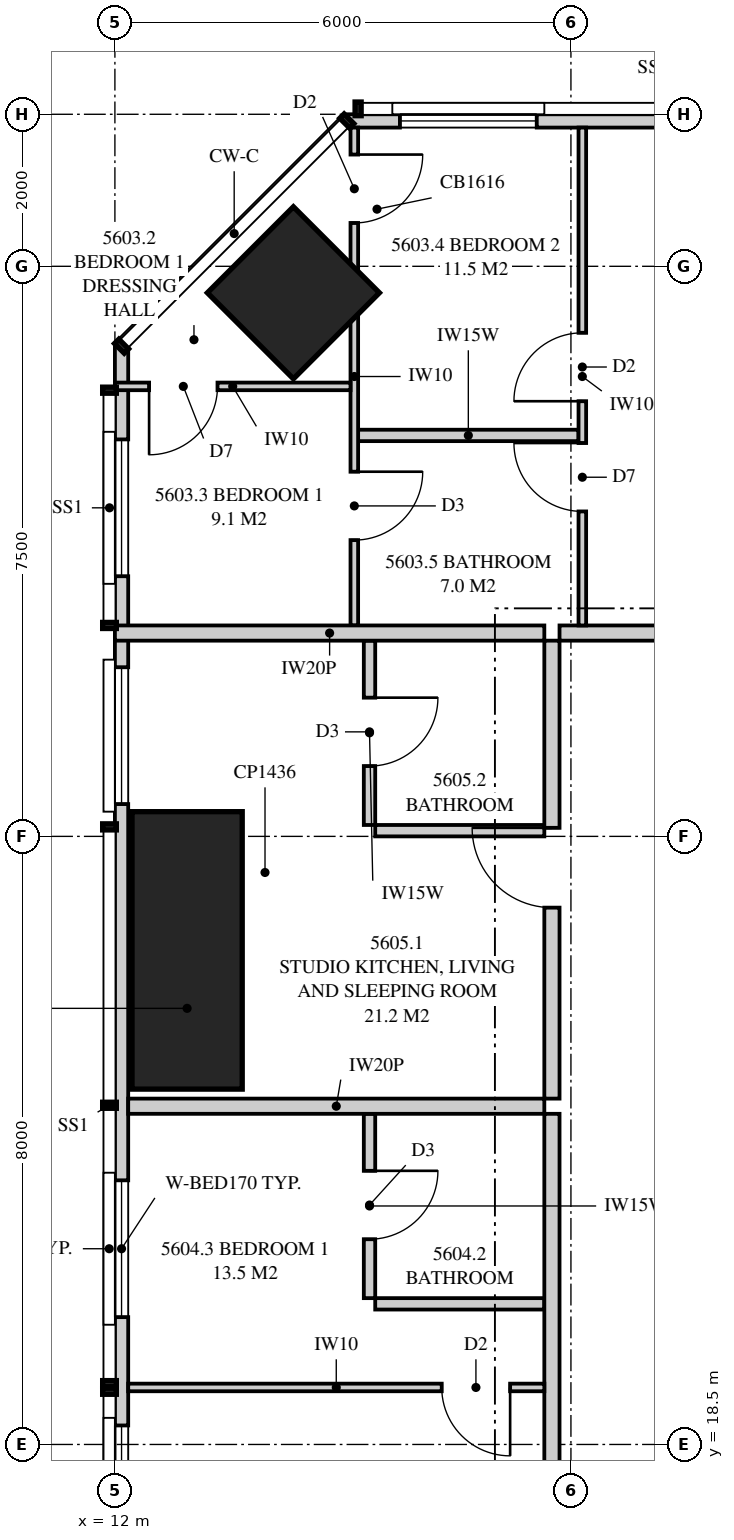
"""IFC4 building model, lengths in metres.
Left out: names, types, materials, properties, quantities, classifications, styles, units other than length and angle.
Written with IfcOpenShell. Run it as: python <this file> out.ifc"""

import sys

from ifc_helpers import new_model, si_unit, direction, frame, frame_2d, origin, origin_2d, place, context, subcontext, project, spatial, polyline, rectangle, hollow_rectangle, outline, extrude, element, fill, save


model = new_model("IFC4")
c1 = context("Model", 3, precision=1e-05, world=origin(), true_north=direction((0.0, 1.0)))
c2 = subcontext(c1, "Body", "Model", "MODEL_VIEW")
j1 = project(units=[si_unit("LENGTHUNIT", "METRE"), si_unit("PLANEANGLEUNIT", "RADIAN")], contexts=[c1])
p1 = place(None, origin())
s1 = spatial("IfcSite", under=j1, at=p1, CompositionType="ELEMENT")
p2 = place(p1, origin())
s2 = spatial("IfcBuilding", under=s1, at=p2, CompositionType="ELEMENT")
p3 = place(p2, frame((0.0, 0.0, 204.6)))
s3 = spatial("IfcBuildingStorey", under=s2, at=p3, CompositionType="ELEMENT", Elevation=204.6)
p4 = place(p3, frame((14.348, 33.652, 0.0), z_axis=(0.0, 0.0, 1.0), x_axis=(0.707106781187, -0.707106781187, 0.0)))
e1 = element("IfcColumn", 1, at=p4, inside=s3, PredefinedType="COLUMN", context=c2, shape_type="SweptSolid", body=[
    extrude(hollow_rectangle(XDim=1.6, YDim=1.6, WallThickness=0.125, at=origin_2d()), origin(), (0.0, 0.0, 1.0), 3.35),
])
p5 = place(p3, frame((12.95, 25.0, 0.0), z_axis=(0.0, 0.0, 1.0), x_axis=(1.0, 0.0, 0.0)))
e2 = element("IfcColumn", 2, at=p5, inside=s3, PredefinedType="COLUMN", context=c2, shape_type="SweptSolid", body=[
    extrude(rectangle(XDim=1.45, YDim=3.65, at=origin_2d()), origin(), (0.0, 0.0, 1.0), 3.35),
])
p6 = place(p3, frame((49.949, 35.913, 0.0), z_axis=(0.0, 0.0, 1.0), x_axis=(-1.0, 0.0, 0.0)))
e3 = element("IfcWall", 3, at=p6, inside=s3, PredefinedType="SOLIDWALL", context=c2, shape_type="SweptSolid", body=[
    extrude(rectangle(XDim=34.897, YDim=0.175, at=frame_2d((17.449, 0.0))), origin(), (0.0, 0.0, 1.0), 3.07),
])
p7 = place(p6, frame((13.174, 0.0, 0.0)))
e4 = element("IfcOpeningElement", 4, at=p7, cuts=e3, PredefinedType="OPENING", context=c2, shape_type="SweptSolid", body=[
    extrude(rectangle(XDim=1.8, YDim=2.1, at=frame_2d((0.9, 1.05))), frame((0.0, 0.097, 0.0), z_axis=(0.0, -1.0, 0.0), x_axis=(1.0, 0.0, 0.0)), (0.0, 0.0, 1.0), 0.195),
])
p8 = place(p6, frame((19.374, 0.0, 0.4)))
e5 = element("IfcOpeningElement", 5, at=p8, cuts=e3, PredefinedType="OPENING", context=c2, shape_type="SweptSolid", body=[
    extrude(rectangle(XDim=1.8, YDim=1.7, at=frame_2d((0.9, 0.85))), frame((0.0, 0.097, 0.0), z_axis=(0.0, -1.0, 0.0), x_axis=(1.0, 0.0, 0.0)), (0.0, 0.0, 1.0), 0.195),
])
p9 = place(p6, frame((23.224, 0.0, 0.4)))
e6 = element("IfcOpeningElement", 6, at=p9, cuts=e3, PredefinedType="OPENING", context=c2, shape_type="SweptSolid", body=[
    extrude(rectangle(XDim=2.4, YDim=1.7, at=frame_2d((1.2, 0.85))), frame((0.0, 0.097, 0.0), z_axis=(0.0, -1.0, 0.0), x_axis=(1.0, 0.0, 0.0)), (0.0, 0.0, 1.0), 0.195),
])
p10 = place(p6, frame((32.399, 0.0, 0.4)))
e7 = element("IfcOpeningElement", 7, at=p10, cuts=e3, PredefinedType="OPENING", context=c2, shape_type="SweptSolid", body=[
    extrude(rectangle(XDim=1.8, YDim=1.7, at=frame_2d((0.9, 0.85))), frame((0.0, 0.097, 0.0), z_axis=(0.0, -1.0, 0.0), x_axis=(1.0, 0.0, 0.0)), (0.0, 0.0, 1.0), 0.195),
])
p11 = place(p3, frame((12.087, 32.949, 0.0), z_axis=(0.0, 0.0, 1.0), x_axis=(0.0, -1.0, 0.0)))
e8 = element("IfcWall", 8, at=p11, inside=s3, PredefinedType="SOLIDWALL", context=c2, shape_type="SweptSolid", body=[
    extrude(rectangle(XDim=29.897, YDim=0.175, at=frame_2d((14.949, 0.0))), origin(), (0.0, 0.0, 1.0), 3.07),
])
p12 = place(p11, frame((1.226, 0.0, 0.4)))
e9 = element("IfcOpeningElement", 9, at=p12, cuts=e8, PredefinedType="OPENING", context=c2, shape_type="SweptSolid", body=[
    extrude(rectangle(XDim=1.8, YDim=1.7, at=frame_2d((0.9, 0.85))), frame((0.0, 0.097, 0.0), z_axis=(0.0, -1.0, 0.0), x_axis=(1.0, 0.0, 0.0)), (0.0, 0.0, 1.0), 0.195),
])
p13 = place(p11, frame((4.224, 0.0, 0.4)))
e10 = element("IfcOpeningElement", 10, at=p13, cuts=e8, PredefinedType="OPENING", context=c2, shape_type="SweptSolid", body=[
    extrude(rectangle(XDim=1.8, YDim=1.7, at=frame_2d((0.9, 0.85))), frame((0.0, 0.097, 0.0), z_axis=(0.0, -1.0, 0.0), x_axis=(1.0, 0.0, 0.0)), (0.0, 0.0, 1.0), 0.195),
])
p14 = place(p11, frame((10.974, 0.0, 0.4)))
e11 = element("IfcOpeningElement", 11, at=p14, cuts=e8, PredefinedType="OPENING", context=c2, shape_type="SweptSolid", body=[
    extrude(rectangle(XDim=1.8, YDim=1.7, at=frame_2d((0.9, 0.85))), frame((0.0, 0.097, 0.0), z_axis=(0.0, -1.0, 0.0), x_axis=(1.0, 0.0, 0.0)), (0.0, 0.0, 1.0), 0.195),
])
p15 = place(p11, frame((14.199, 0.0, 0.4)))
e12 = element("IfcOpeningElement", 12, at=p15, cuts=e8, PredefinedType="OPENING", context=c2, shape_type="SweptSolid", body=[
    extrude(rectangle(XDim=1.8, YDim=1.7, at=frame_2d((0.9, 0.85))), frame((0.0, 0.097, 0.0), z_axis=(0.0, -1.0, 0.0), x_axis=(1.0, 0.0, 0.0)), (0.0, 0.0, 1.0), 0.195),
])
p16 = place(p11, frame((22.624, 0.0, 0.0)))
e13 = element("IfcOpeningElement", 13, at=p16, cuts=e8, PredefinedType="OPENING", context=c2, shape_type="SweptSolid", body=[
    extrude(rectangle(XDim=1.8, YDim=2.1, at=frame_2d((0.9, 1.05))), frame((0.0, 0.097, 0.0), z_axis=(0.0, -1.0, 0.0), x_axis=(1.0, 0.0, 0.0)), (0.0, 0.0, 1.0), 0.195),
])
p17 = place(p11, frame((16.799, 0.0, 0.4)))
e14 = element("IfcOpeningElement", 14, at=p17, cuts=e8, PredefinedType="OPENING", context=c2, shape_type="SweptSolid", body=[
    extrude(rectangle(XDim=1.2, YDim=1.7, at=frame_2d((0.6, 0.85))), frame((0.0, 0.097, 0.0), z_axis=(0.0, -1.0, 0.0), x_axis=(1.0, 0.0, 0.0)), (0.0, 0.0, 1.0), 0.195),
])
p18 = place(p11, frame((26.371, 0.0, 0.4)))
e15 = element("IfcOpeningElement", 15, at=p18, cuts=e8, PredefinedType="OPENING", context=c2, shape_type="SweptSolid", body=[
    extrude(rectangle(XDim=1.8, YDim=1.7, at=frame_2d((0.9, 0.85))), frame((0.0, 0.097, 0.0), z_axis=(0.0, -1.0, 0.0), x_axis=(1.0, 0.0, 0.0)), (0.0, 0.0, 1.0), 0.195),
])
p19 = place(p3, frame((17.85, 29.175, 0.0), z_axis=(0.0, 0.0, 1.0), x_axis=(1.0, 0.0, 0.0)))
e16 = element("IfcWall", 16, at=p19, inside=s3, PredefinedType="PARTITIONING", context=c2, shape_type="SweptSolid", body=[
    extrude(outline(polyline([(0.0, 0.0), (3.85, 0.0), (3.85, 2.47), (3.69, 2.47), (3.69, 3.07), (3.079, 3.07), (3.079, 2.491), (2.535, 2.491), (2.535, 3.07), (0.0, 3.07), (0.0, 0.0)])), frame((0.0, 0.1, 0.0), z_axis=(0.0, -1.0, 0.0), x_axis=(1.0, 0.0, 0.0)), (0.0, 0.0, 1.0), 0.2),
])
p20 = place(p3, frame((15.15, 35.825, 0.0), z_axis=(0.0, 0.0, 1.0), x_axis=(0.0, -1.0, 0.0)))
e17 = element("IfcWall", 17, at=p20, inside=s3, PredefinedType="PARTITIONING", context=c2, shape_type="SweptSolid", body=[
    extrude(outline(polyline([(0.0, 0.0), (6.55, 0.0), (6.55, 3.07), (2.565, 3.07), (2.548, 3.043), (2.548, 2.07), (1.515, 2.07), (1.515, 3.07), (0.0, 3.07), (0.0, 0.0)])), frame((0.0, 0.05, 0.0), z_axis=(0.0, -1.0, 0.0), x_axis=(1.0, 0.0, 0.0)), (0.0, 0.0, 1.0), 0.1),
])
p21 = place(p20, frame((0.355, 0.0, 0.0)))
e18 = element("IfcOpeningElement", 18, at=p21, cuts=e17, PredefinedType="OPENING", context=c2, shape_type="SweptSolid", body=[
    extrude(rectangle(XDim=0.9, YDim=2.1, at=frame_2d((0.45, 1.05))), frame((0.0, 0.06, 0.0), z_axis=(0.0, -1.0, 0.0), x_axis=(1.0, 0.0, 0.0)), (0.0, 0.0, 1.0), 0.12),
])
p22 = place(p20, frame((4.527, 0.0, 0.0)))
e19 = element("IfcOpeningElement", 19, at=p22, cuts=e17, PredefinedType="OPENING", context=c2, shape_type="SweptSolid", body=[
    extrude(rectangle(XDim=0.9, YDim=2.1, at=frame_2d((0.45, 1.05))), frame((0.0, 0.06, 0.0), z_axis=(0.0, -1.0, 0.0), x_axis=(1.0, 0.0, 0.0)), (0.0, 0.0, 1.0), 0.12),
])
p23 = place(p3, frame((18.15, 35.825, 0.0), z_axis=(0.0, 0.0, 1.0), x_axis=(0.0, -1.0, 0.0)))
e20 = element("IfcWall", 20, at=p23, inside=s3, PredefinedType="PARTITIONING", context=c2, shape_type="SweptSolid", body=[
    extrude(outline(polyline([(0.0, 0.0), (6.55, 0.0), (6.55, 3.07), (2.017, 3.07), (2.017, 2.07), (0.984, 2.07), (0.984, 3.07), (0.0, 3.07), (0.0, 0.0)])), frame((0.0, 0.05, 0.0), z_axis=(0.0, -1.0, 0.0), x_axis=(1.0, 0.0, 0.0)), (0.0, 0.0, 1.0), 0.1),
])
p24 = place(p23, frame((2.7, 0.0, 0.0)))
e21 = element("IfcOpeningElement", 21, at=p24, cuts=e20, PredefinedType="OPENING", context=c2, shape_type="SweptSolid", body=[
    extrude(rectangle(XDim=0.9, YDim=2.1, at=frame_2d((0.45, 1.05))), frame((0.0, 0.06, 0.0), z_axis=(0.0, -1.0, 0.0), x_axis=(1.0, 0.0, 0.0)), (0.0, 0.0, 1.0), 0.12),
])
p25 = place(p23, frame((4.15, 0.0, 0.0)))
e22 = element("IfcOpeningElement", 22, at=p25, cuts=e20, PredefinedType="OPENING", context=c2, shape_type="SweptSolid", body=[
    extrude(rectangle(XDim=0.9, YDim=2.1, at=frame_2d((0.45, 1.05))), frame((0.0, 0.06, 0.0), z_axis=(0.0, -1.0, 0.0), x_axis=(1.0, 0.0, 0.0)), (0.0, 0.0, 1.0), 0.12),
])
p26 = place(p3, frame((12.0, 32.42, 0.0), z_axis=(0.0, 0.0, 1.0), x_axis=(1.0, 0.0, 0.0)))
e23 = element("IfcWall", 23, at=p26, inside=s3, PredefinedType="PARTITIONING", context=c2, shape_type="SweptSolid", body=[
    extrude(outline(polyline([(0.0, 0.0), (3.1, 0.0), (3.1, 3.07), (2.664, 3.07), (2.664, 2.07), (1.635, 2.07), (1.635, 3.07), (0.0, 3.07), (0.0, 0.0)])), frame((0.0, 0.05, 0.0), z_axis=(0.0, -1.0, 0.0), x_axis=(1.0, 0.0, 0.0)), (0.0, 0.0, 1.0), 0.1),
])
p27 = place(p26, frame((0.45, 0.0, 0.0)))
e24 = element("IfcOpeningElement", 24, at=p27, cuts=e23, PredefinedType="OPENING", context=c2, shape_type="SweptSolid", body=[
    extrude(rectangle(XDim=0.9, YDim=2.1, at=frame_2d((0.45, 1.05))), frame((0.0, 0.06, 0.0), z_axis=(0.0, -1.0, 0.0), x_axis=(1.0, 0.0, 0.0)), (0.0, 0.0, 1.0), 0.12),
])
p28 = place(p3, frame((15.2, 31.775, 0.0), z_axis=(0.0, 0.0, 1.0), x_axis=(1.0, 0.0, 0.0)))
e25 = element("IfcWall", 25, at=p28, inside=s3, PredefinedType="PLUMBINGWALL", context=c2, shape_type="SweptSolid", body=[
    extrude(rectangle(XDim=2.9, YDim=0.15, at=frame_2d((1.45, 0.0))), origin(), (0.0, 0.0, 1.0), 3.07),
])
p29 = place(p3, frame((12.0, 29.175, 0.0), z_axis=(0.0, 0.0, 1.0), x_axis=(1.0, 0.0, 0.0)))
e26 = element("IfcWall", 26, at=p29, inside=s3, PredefinedType="PARTITIONING", context=c2, shape_type="SweptSolid", body=[
    extrude(outline(polyline([(0.0, 0.0), (5.65, 0.0), (5.65, 3.07), (2.147, 3.07), (2.147, 2.07), (1.102, 2.07), (1.102, 3.07), (0.0, 3.07), (0.0, 0.0)])), frame((0.0, 0.1, 0.0), z_axis=(0.0, -1.0, 0.0), x_axis=(1.0, 0.0, 0.0)), (0.0, 0.0, 1.0), 0.2),
])
p30 = place(p3, frame((12.175, 22.95, 0.0), z_axis=(0.0, 0.0, 1.0), x_axis=(1.0, 0.0, 0.0)))
e27 = element("IfcWall", 27, at=p30, inside=s3, PredefinedType="PARTITIONING", context=c2, shape_type="SweptSolid", body=[
    extrude(outline(polyline([(0.0, 0.0), (5.475, 0.0), (5.475, 3.07), (1.674, 3.07), (1.674, 3.014), (1.63, 2.924), (1.275, 2.895), (1.275, 2.07), (0.275, 2.07), (0.275, 3.07), (0.0, 3.07), (0.0, 0.0)])), frame((0.0, 0.1, 0.0), z_axis=(0.0, -1.0, 0.0), x_axis=(1.0, 0.0, 0.0)), (0.0, 0.0, 1.0), 0.2),
])
p31 = place(p3, frame((17.75, 7.925, 0.0), z_axis=(0.0, 0.0, 1.0), x_axis=(0.0, 1.0, 0.0)))
e28 = element("IfcWall", 28, at=p31, inside=s3, PredefinedType="PARTITIONING", context=c2, shape_type="SweptSolid", body=[
    extrude(outline(polyline([(0.0, 0.0), (14.925, 0.0), (14.925, 3.07), (5.287, 3.07), (5.287, 2.595), (4.863, 2.595), (4.863, 3.07), (0.0, 3.07), (0.0, 0.0)])), frame((0.0, 0.1, 0.0), z_axis=(0.0, -1.0, 0.0), x_axis=(1.0, 0.0, 0.0)), (0.0, 0.0, 1.0), 0.2),
])
p32 = place(p31, frame((6.962, 0.0, 0.0)))
e29 = element("IfcOpeningElement", 29, at=p32, cuts=e28, PredefinedType="OPENING", context=c2, shape_type="SweptSolid", body=[
    extrude(rectangle(XDim=1.05, YDim=2.2, at=frame_2d((0.525, 1.1))), frame((0.0, 0.11, 0.0), z_axis=(0.0, -1.0, 0.0), x_axis=(1.0, 0.0, 0.0)), (0.0, 0.0, 1.0), 0.22),
])
p33 = place(p3, frame((15.35, 20.425, 0.0), z_axis=(0.0, 0.0, 1.0), x_axis=(0.0, 1.0, 0.0)))
e30 = element("IfcWall", 30, at=p33, inside=s3, PredefinedType="PLUMBINGWALL", context=c2, shape_type="SweptSolid", body=[
    extrude(rectangle(XDim=2.425, YDim=0.15, at=frame_2d((1.212, 0.0))), origin(), (0.0, 0.0, 1.0), 3.07),
])
p34 = place(p33, frame((0.775, 0.0, 0.0)))
e31 = element("IfcOpeningElement", 31, at=p34, cuts=e30, PredefinedType="OPENING", context=c2, shape_type="SweptSolid", body=[
    extrude(rectangle(XDim=0.9, YDim=2.1, at=frame_2d((0.45, 1.05))), frame((0.0, 0.085, 0.0), z_axis=(0.0, -1.0, 0.0), x_axis=(1.0, 0.0, 0.0)), (0.0, 0.0, 1.0), 0.17),
])
p35 = place(p3, frame((15.425, 20.35, 0.0), z_axis=(0.0, 0.0, 1.0), x_axis=(1.0, 0.0, 0.0)))
e32 = element("IfcWall", 32, at=p35, inside=s3, PredefinedType="PLUMBINGWALL", context=c2, shape_type="SweptSolid", body=[
    extrude(rectangle(XDim=2.225, YDim=0.15, at=frame_2d((1.112, 0.0))), origin(), (0.0, 0.0, 1.0), 3.07),
])
p36 = place(p3, frame((12.175, 19.25, 0.0), z_axis=(0.0, 0.0, 1.0), x_axis=(1.0, 0.0, 0.0)))
e33 = element("IfcWall", 33, at=p36, inside=s3, PredefinedType="PARTITIONING", context=c2, shape_type="SweptSolid", body=[
    extrude(outline(polyline([(0.0, 0.0), (5.475, 0.0), (5.475, 3.07), (1.275, 3.07), (1.275, 2.07), (0.275, 2.07), (0.275, 3.07), (0.0, 3.07), (0.0, 0.0)])), frame((0.0, 0.05, 0.0), z_axis=(0.0, -1.0, 0.0), x_axis=(1.0, 0.0, 0.0)), (0.0, 0.0, 1.0), 0.1),
])
p37 = place(p36, frame((4.125, 0.0, 0.0)))
e34 = element("IfcOpeningElement", 34, at=p37, cuts=e33, PredefinedType="OPENING", context=c2, shape_type="SweptSolid", body=[
    extrude(rectangle(XDim=0.9, YDim=2.1, at=frame_2d((0.45, 1.05))), frame((0.0, 0.06, 0.0), z_axis=(0.0, -1.0, 0.0), x_axis=(1.0, 0.0, 0.0)), (0.0, 0.0, 1.0), 0.12),
])
p38 = place(p3, frame((17.75, 23.05, 0.0), z_axis=(0.0, 0.0, 1.0), x_axis=(0.0, 1.0, 0.0)))
e35 = element("IfcWall", 35, at=p38, inside=s3, PredefinedType="PARTITIONING", context=c2, shape_type="SweptSolid", body=[
    extrude(outline(polyline([(0.0, 0.0), (6.025, 0.0), (6.025, 3.07), (2.162, 3.07), (2.162, 2.595), (1.738, 2.595), (1.738, 3.07), (0.0, 3.07), (0.0, 0.0)])), frame((0.0, 0.1, 0.0), z_axis=(0.0, -1.0, 0.0), x_axis=(1.0, 0.0, 0.0)), (0.0, 0.0, 1.0), 0.2),
])
p39 = place(p38, frame((2.512, 0.0, 0.0)))
e36 = element("IfcOpeningElement", 36, at=p39, cuts=e35, PredefinedType="OPENING", context=c2, shape_type="SweptSolid", body=[
    extrude(rectangle(XDim=1.05, YDim=2.2, at=frame_2d((0.525, 1.1))), frame((0.0, 0.11, 0.0), z_axis=(0.0, -1.0, 0.0), x_axis=(1.0, 0.0, 0.0)), (0.0, 0.0, 1.0), 0.22),
])
p40 = place(p3, frame((15.35, 26.65, 0.0), z_axis=(0.0, 0.0, 1.0), x_axis=(0.0, 1.0, 0.0)))
e37 = element("IfcWall", 37, at=p40, inside=s3, PredefinedType="PLUMBINGWALL", context=c2, shape_type="SweptSolid", body=[
    extrude(rectangle(XDim=2.425, YDim=0.15, at=frame_2d((1.212, 0.0))), origin(), (0.0, 0.0, 1.0), 3.07),
])
p41 = place(p40, frame((0.775, 0.0, 0.0)))
e38 = element("IfcOpeningElement", 38, at=p41, cuts=e37, PredefinedType="OPENING", context=c2, shape_type="SweptSolid", body=[
    extrude(rectangle(XDim=0.9, YDim=2.1, at=frame_2d((0.45, 1.05))), frame((0.0, 0.085, 0.0), z_axis=(0.0, -1.0, 0.0), x_axis=(1.0, 0.0, 0.0)), (0.0, 0.0, 1.0), 0.17),
])
p42 = place(p3, frame((15.425, 26.575, 0.0), z_axis=(0.0, 0.0, 1.0), x_axis=(1.0, 0.0, 0.0)))
e39 = element("IfcWall", 39, at=p42, inside=s3, PredefinedType="PLUMBINGWALL", context=c2, shape_type="SweptSolid", body=[
    extrude(rectangle(XDim=2.225, YDim=0.15, at=frame_2d((1.112, 0.0))), origin(), (0.0, 0.0, 1.0), 3.07),
])
p43 = place(p10, origin())
e40 = element("IfcWindow", 40, at=p43, inside=s3, PartitioningType="SINGLE_PANEL", PredefinedType="WINDOW", context=c2, shape_type="SweptSolid", body=[
    extrude(rectangle(XDim=1.8, YDim=1.7, at=frame_2d((0.9, 0.85))), frame((0.0, 0.03, 0.0), z_axis=(0.0, -1.0, 0.0), x_axis=(1.0, 0.0, 0.0)), (0.0, 0.0, 1.0), 0.06),
])
fill(e7, e40)
p44 = place(p12, origin())
e41 = element("IfcWindow", 41, at=p44, inside=s3, PartitioningType="SINGLE_PANEL", PredefinedType="WINDOW", context=c2, shape_type="SweptSolid", body=[
    extrude(rectangle(XDim=1.8, YDim=1.7, at=frame_2d((0.9, 0.85))), frame((0.0, 0.03, 0.0), z_axis=(0.0, -1.0, 0.0), x_axis=(1.0, 0.0, 0.0)), (0.0, 0.0, 1.0), 0.06),
])
fill(e9, e41)
p45 = place(p13, origin())
e42 = element("IfcWindow", 42, at=p45, inside=s3, PartitioningType="SINGLE_PANEL", PredefinedType="WINDOW", context=c2, shape_type="SweptSolid", body=[
    extrude(rectangle(XDim=1.8, YDim=1.7, at=frame_2d((0.9, 0.85))), frame((0.0, 0.03, 0.0), z_axis=(0.0, -1.0, 0.0), x_axis=(1.0, 0.0, 0.0)), (0.0, 0.0, 1.0), 0.06),
])
fill(e10, e42)
p46 = place(p14, origin())
e43 = element("IfcWindow", 43, at=p46, inside=s3, PartitioningType="SINGLE_PANEL", PredefinedType="WINDOW", context=c2, shape_type="SweptSolid", body=[
    extrude(rectangle(XDim=1.8, YDim=1.7, at=frame_2d((0.9, 0.85))), frame((0.0, 0.03, 0.0), z_axis=(0.0, -1.0, 0.0), x_axis=(1.0, 0.0, 0.0)), (0.0, 0.0, 1.0), 0.06),
])
fill(e11, e43)
p47 = place(p15, origin())
e44 = element("IfcWindow", 44, at=p47, inside=s3, PartitioningType="SINGLE_PANEL", PredefinedType="WINDOW", context=c2, shape_type="SweptSolid", body=[
    extrude(rectangle(XDim=1.8, YDim=1.7, at=frame_2d((0.9, 0.85))), frame((0.0, 0.03, 0.0), z_axis=(0.0, -1.0, 0.0), x_axis=(1.0, 0.0, 0.0)), (0.0, 0.0, 1.0), 0.06),
])
fill(e12, e44)
p48 = place(p27, frame((0.9, 0.0, 0.0), z_axis=(0.0, 0.0, 1.0), x_axis=(-1.0, 0.0, 0.0)))
e45 = element("IfcDoor", 45, at=p48, inside=s3, OperationType="SINGLE_SWING_RIGHT", PredefinedType="DOOR", context=c2, shape_type="SweptSolid", body=[
    extrude(rectangle(XDim=0.9, YDim=2.1, at=frame_2d((0.45, 1.05))), frame((0.0, 0.025, 0.0), z_axis=(0.0, -1.0, 0.0), x_axis=(1.0, 0.0, 0.0)), (0.0, 0.0, 1.0), 0.05),
])
fill(e24, e45)
p49 = place(p21, origin())
e46 = element("IfcDoor", 46, at=p49, inside=s3, OperationType="SINGLE_SWING_LEFT", PredefinedType="DOOR", context=c2, shape_type="SweptSolid", body=[
    extrude(rectangle(XDim=0.9, YDim=2.1, at=frame_2d((0.45, 1.05))), frame((0.0, 0.025, 0.0), z_axis=(0.0, -1.0, 0.0), x_axis=(1.0, 0.0, 0.0)), (0.0, 0.0, 1.0), 0.05),
])
fill(e18, e46)
p50 = place(p24, frame((0.9, 0.0, 0.0), z_axis=(0.0, 0.0, 1.0), x_axis=(-1.0, 0.0, 0.0)))
e47 = element("IfcDoor", 47, at=p50, inside=s3, OperationType="SINGLE_SWING_LEFT", PredefinedType="DOOR", context=c2, shape_type="SweptSolid", body=[
    extrude(rectangle(XDim=0.9, YDim=2.1, at=frame_2d((0.45, 1.05))), frame((0.0, 0.025, 0.0), z_axis=(0.0, -1.0, 0.0), x_axis=(1.0, 0.0, 0.0)), (0.0, 0.0, 1.0), 0.05),
])
fill(e21, e47)
p51 = place(p25, frame((0.9, 0.0, 0.0), z_axis=(0.0, 0.0, 1.0), x_axis=(-1.0, 0.0, 0.0)))
e48 = element("IfcDoor", 48, at=p51, inside=s3, OperationType="SINGLE_SWING_RIGHT", PredefinedType="DOOR", context=c2, shape_type="SweptSolid", body=[
    extrude(rectangle(XDim=0.9, YDim=2.1, at=frame_2d((0.45, 1.05))), frame((0.0, 0.025, 0.0), z_axis=(0.0, -1.0, 0.0), x_axis=(1.0, 0.0, 0.0)), (0.0, 0.0, 1.0), 0.05),
])
fill(e22, e48)
p52 = place(p22, origin())
e49 = element("IfcDoor", 49, at=p52, inside=s3, OperationType="SINGLE_SWING_LEFT", PredefinedType="DOOR", context=c2, shape_type="SweptSolid", body=[
    extrude(rectangle(XDim=0.9, YDim=2.1, at=frame_2d((0.45, 1.05))), frame((0.0, 0.025, 0.0), z_axis=(0.0, -1.0, 0.0), x_axis=(1.0, 0.0, 0.0)), (0.0, 0.0, 1.0), 0.05),
])
fill(e19, e49)
p53 = place(p34, frame((0.9, 0.0, 0.0), z_axis=(0.0, 0.0, 1.0), x_axis=(-1.0, 0.0, 0.0)))
e50 = element("IfcDoor", 50, at=p53, inside=s3, OperationType="SINGLE_SWING_LEFT", PredefinedType="DOOR", context=c2, shape_type="SweptSolid", body=[
    extrude(rectangle(XDim=0.9, YDim=2.1, at=frame_2d((0.45, 1.05))), frame((0.0, 0.025, 0.0), z_axis=(0.0, -1.0, 0.0), x_axis=(1.0, 0.0, 0.0)), (0.0, 0.0, 1.0), 0.05),
])
fill(e31, e50)
p54 = place(p37, frame((0.9, 0.0, 0.0), z_axis=(0.0, 0.0, 1.0), x_axis=(-1.0, 0.0, 0.0)))
e51 = element("IfcDoor", 51, at=p54, inside=s3, OperationType="SINGLE_SWING_LEFT", PredefinedType="DOOR", context=c2, shape_type="SweptSolid", body=[
    extrude(rectangle(XDim=0.9, YDim=2.1, at=frame_2d((0.45, 1.05))), frame((0.0, 0.025, 0.0), z_axis=(0.0, -1.0, 0.0), x_axis=(1.0, 0.0, 0.0)), (0.0, 0.0, 1.0), 0.05),
])
fill(e34, e51)
p55 = place(p39, origin())
e52 = element("IfcDoor", 52, at=p55, inside=s3, OperationType="SINGLE_SWING_RIGHT", PredefinedType="DOOR", context=c2, shape_type="SweptSolid", body=[
    extrude(rectangle(XDim=1.05, YDim=2.2, at=frame_2d((0.525, 1.1))), frame((0.0, 0.025, 0.0), z_axis=(0.0, -1.0, 0.0), x_axis=(1.0, 0.0, 0.0)), (0.0, 0.0, 1.0), 0.05),
])
fill(e36, e52)
p56 = place(p41, frame((0.9, 0.0, 0.0), z_axis=(0.0, 0.0, 1.0), x_axis=(-1.0, 0.0, 0.0)))
e53 = element("IfcDoor", 53, at=p56, inside=s3, OperationType="SINGLE_SWING_LEFT", PredefinedType="DOOR", context=c2, shape_type="SweptSolid", body=[
    extrude(rectangle(XDim=0.9, YDim=2.1, at=frame_2d((0.45, 1.05))), frame((0.0, 0.025, 0.0), z_axis=(0.0, -1.0, 0.0), x_axis=(1.0, 0.0, 0.0)), (0.0, 0.0, 1.0), 0.05),
])
fill(e38, e53)
save(model, sys.argv[1])
